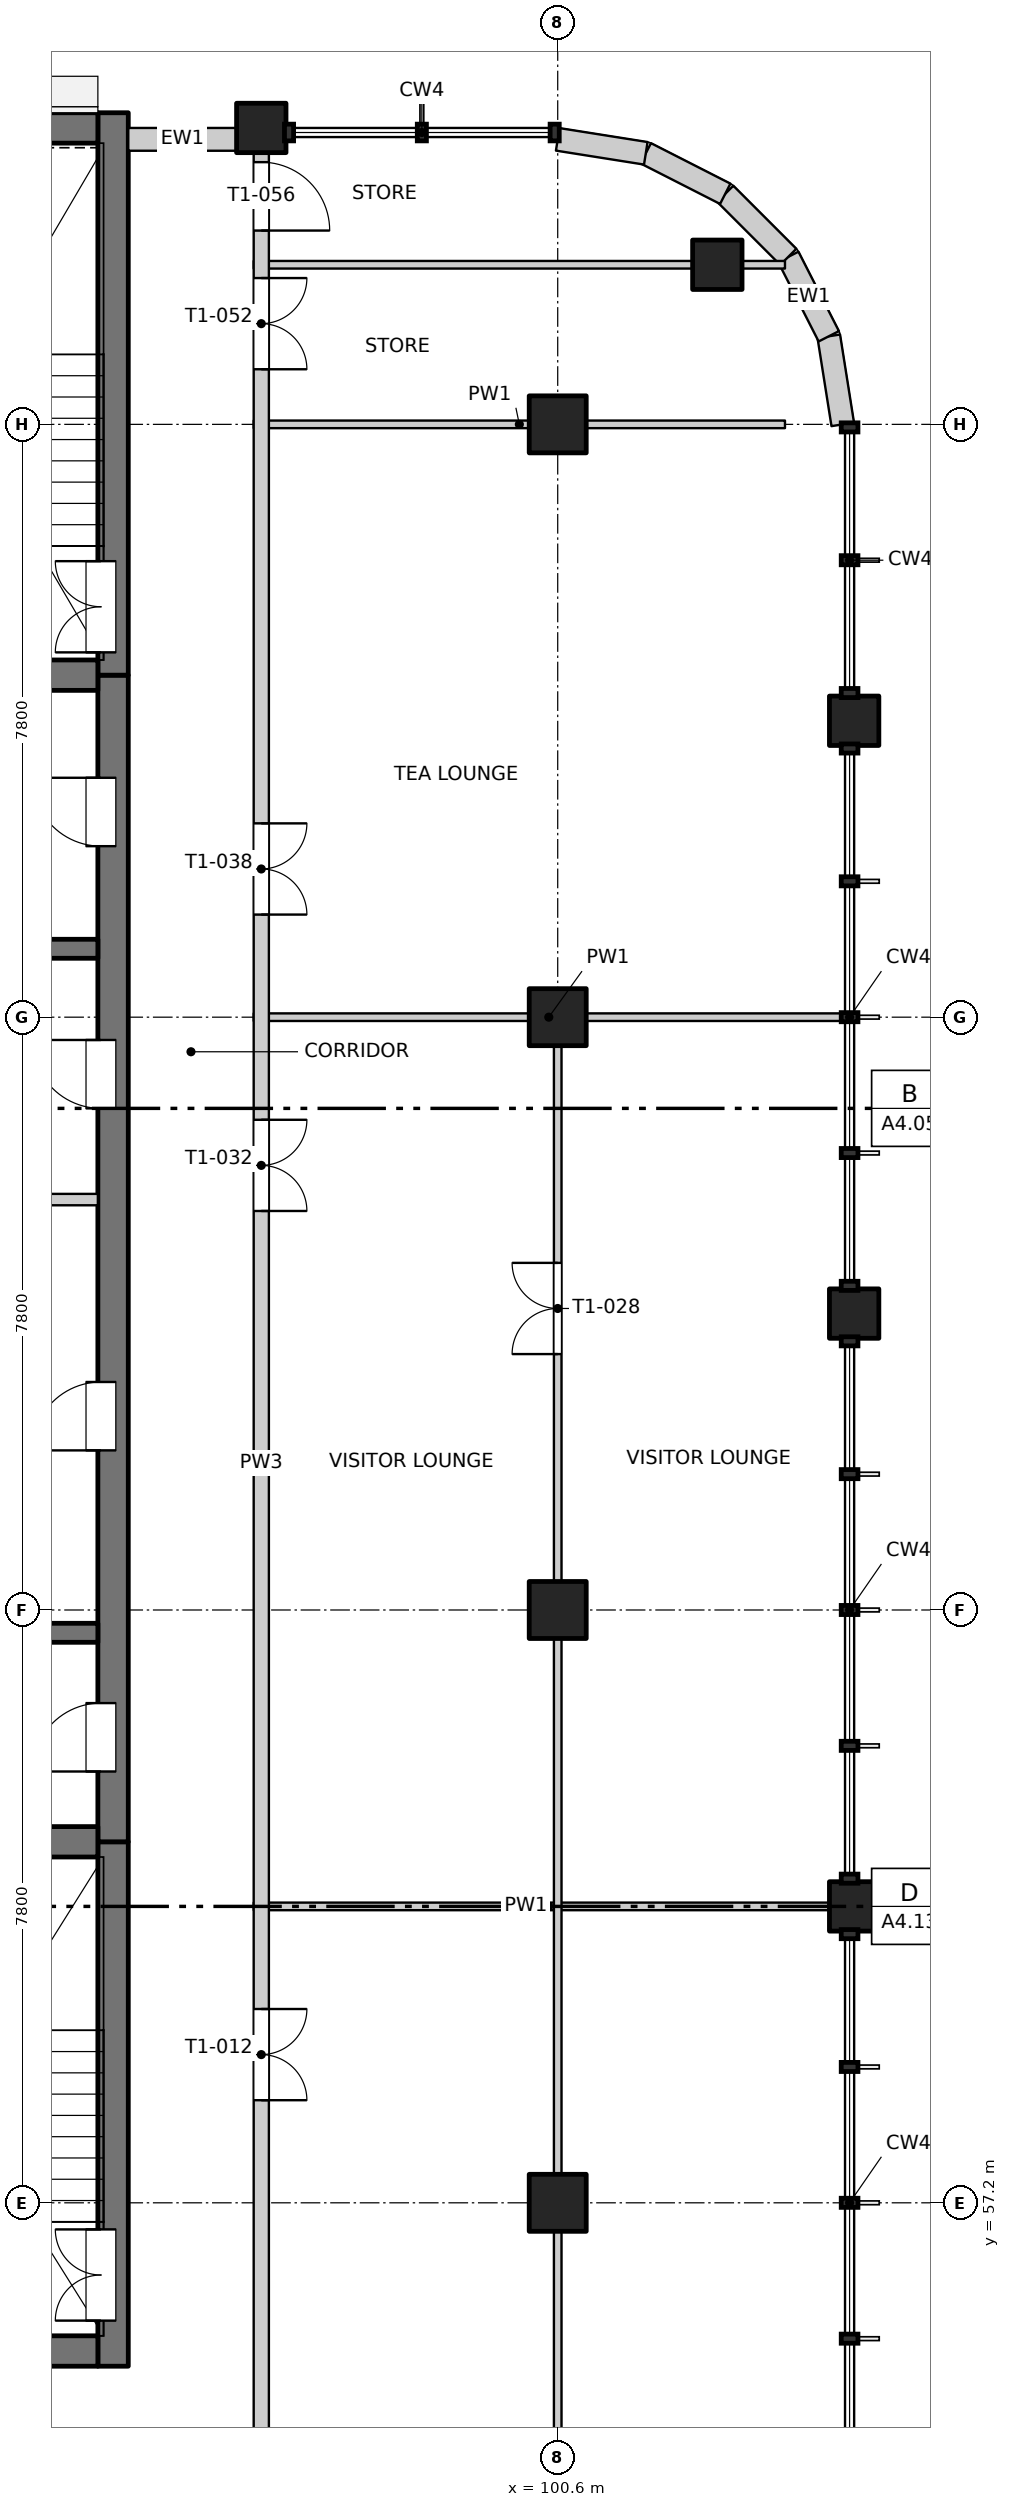
"""IFC4 building model, lengths in metres.
Left out: names, types, materials, properties, quantities, classifications, styles, units other than length and angle.
Written with IfcOpenShell. Run it as: python <this file> out.ifc"""

import sys

from ifc_helpers import new_model, si_unit, direction, frame, frame_2d, origin, origin_2d, place, context, subcontext, project, spatial, rectangle, extrude, element, fill, save


model = new_model("IFC4")
c1 = context("Model", 3, precision=1e-05, world=origin(), true_north=direction((0.0, 1.0)))
c2 = subcontext(c1, "Body", "Model", "MODEL_VIEW")
j1 = project(units=[si_unit("LENGTHUNIT", "METRE"), si_unit("PLANEANGLEUNIT", "RADIAN")], contexts=[c1])
p1 = place(None, origin())
s1 = spatial("IfcSite", under=j1, at=p1, CompositionType="ELEMENT")
p2 = place(p1, origin())
s2 = spatial("IfcBuilding", under=s1, at=p2, CompositionType="ELEMENT")
p3 = place(p2, frame((0.0, 0.0, 263.0)))
s3 = spatial("IfcBuildingStorey", under=s2, at=p3, CompositionType="ELEMENT", Elevation=263.0)
for number, where, z_axis, x_axis in (
    (1, (102.7, 82.7, -0.25), (0.0, 0.0, 1.0), (1.0, 0.0, 0.0)),
    (2, (104.5, 61.1, -0.25), (0.0, 0.0, 1.0), (1.0, 0.0, 0.0)),
    (3, (104.5, 68.9, -0.25), (0.0, 0.0, 1.0), (1.0, 0.0, 0.0)),
    (4, (104.5, 76.7, -0.25), (0.0, 0.0, 1.0), (1.0, 0.0, 0.0)),
    (5, (96.7, 84.5, -0.25), (0.0, 0.0, 1.0), (1.0, 0.0, 0.0)),
):
    element("IfcColumn", number, at=place(p3, frame(where, z_axis=z_axis, x_axis=x_axis)), inside=s3, PredefinedType="COLUMN", context=c2, shape_type="SweptSolid", body=[
        extrude(rectangle(XDim=0.65, YDim=0.65, at=origin_2d()), origin(), (0.0, 0.0, 1.0), 3.35),
    ])
for number, where, z_axis, x_axis in (
    (6, (100.6, 57.2, -0.25), (0.0, 0.0, 1.0), (1.0, 0.0, 0.0)),
    (7, (100.6, 65.0, -0.25), (0.0, 0.0, 1.0), (1.0, 0.0, 0.0)),
    (8, (100.6, 72.8, -0.25), (0.0, 0.0, 1.0), (1.0, 0.0, 0.0)),
    (9, (100.6, 80.6, -0.25), (0.0, 0.0, 1.0), (1.0, 0.0, 0.0)),
):
    element("IfcColumn", number, at=place(p3, frame(where, z_axis=z_axis, x_axis=x_axis)), inside=s3, PredefinedType="COLUMN", context=c2, shape_type="SweptSolid", body=[
        extrude(rectangle(XDim=0.75, YDim=0.75, at=origin_2d()), origin(), (0.0, 0.0, 1.0), 3.35),
    ])
p4 = place(p3, frame((94.75, 55.05, -0.25), z_axis=(0.0, 0.0, 1.0), x_axis=(0.0, 1.0, 0.0)))
e10 = element("IfcWall", 10, at=p4, inside=s3, PredefinedType="SOLIDWALL", context=c2, shape_type="SweptSolid", body=[
    extrude(rectangle(XDim=6.9, YDim=0.4, at=frame_2d((3.45, 0.0))), origin(), (0.0, 0.0, 1.0), 3.35),
])
p5 = place(p4, frame((0.6, 0.0, 0.25)))
e11 = element("IfcOpeningElement", 11, at=p5, cuts=e10, PredefinedType="OPENING", context=c2, shape_type="SweptSolid", body=[
    extrude(rectangle(XDim=1.2, YDim=2.1, at=frame_2d((0.6, 1.05))), frame((0.0, 0.21, 0.0), z_axis=(0.0, -1.0, 0.0), x_axis=(1.0, 0.0, 0.0)), (0.0, 0.0, 1.0), 0.42),
])
p6 = place(p3, frame((94.75, 61.95, -0.25), z_axis=(0.0, 0.0, 1.0), x_axis=(0.0, 1.0, 0.0)))
e12 = element("IfcWall", 12, at=p6, inside=s3, PredefinedType="SOLIDWALL", context=c2, shape_type="SweptSolid", body=[
    extrude(rectangle(XDim=15.35, YDim=0.4, at=frame_2d((7.675, 0.0))), origin(), (0.0, 0.0, 1.0), 3.35),
])
p7 = place(p6, frame((0.925, 0.0, 0.25)))
e13 = element("IfcOpeningElement", 13, at=p7, cuts=e12, PredefinedType="OPENING", context=c2, shape_type="SweptSolid", body=[
    extrude(rectangle(XDim=0.9, YDim=2.1, at=frame_2d((0.45, 1.05))), frame((0.0, 0.21, 0.0), z_axis=(0.0, -1.0, 0.0), x_axis=(1.0, 0.0, 0.0)), (0.0, 0.0, 1.0), 0.42),
])
p8 = place(p6, frame((5.15, 0.0, 0.25)))
e14 = element("IfcOpeningElement", 14, at=p8, cuts=e12, PredefinedType="OPENING", context=c2, shape_type="SweptSolid", body=[
    extrude(rectangle(XDim=0.9, YDim=2.1, at=frame_2d((0.45, 1.05))), frame((0.0, 0.21, 0.0), z_axis=(0.0, -1.0, 0.0), x_axis=(1.0, 0.0, 0.0)), (0.0, 0.0, 1.0), 0.42),
])
p9 = place(p6, frame((9.65, 0.0, 0.25)))
e15 = element("IfcOpeningElement", 15, at=p9, cuts=e12, PredefinedType="OPENING", context=c2, shape_type="SweptSolid", body=[
    extrude(rectangle(XDim=0.9, YDim=2.1, at=frame_2d((0.45, 1.05))), frame((0.0, 0.21, 0.0), z_axis=(0.0, -1.0, 0.0), x_axis=(1.0, 0.0, 0.0)), (0.0, 0.0, 1.0), 0.42),
])
p10 = place(p6, frame((13.1, 0.0, 0.25)))
e16 = element("IfcOpeningElement", 16, at=p10, cuts=e12, PredefinedType="OPENING", context=c2, shape_type="SweptSolid", body=[
    extrude(rectangle(XDim=0.9, YDim=2.1, at=frame_2d((0.45, 1.05))), frame((0.0, 0.21, 0.0), z_axis=(0.0, -1.0, 0.0), x_axis=(1.0, 0.0, 0.0)), (0.0, 0.0, 1.0), 0.42),
])
p11 = place(p3, frame((94.75, 77.3, -0.25), z_axis=(0.0, 0.0, 1.0), x_axis=(0.0, 1.0, 0.0)))
e17 = element("IfcWall", 17, at=p11, inside=s3, PredefinedType="SOLIDWALL", context=c2, shape_type="SweptSolid", body=[
    extrude(rectangle(XDim=7.4, YDim=0.4, at=frame_2d((3.7, 0.0))), origin(), (0.0, 0.0, 1.0), 3.35),
])
p12 = place(p11, frame((0.3, 0.0, 0.25)))
e18 = element("IfcOpeningElement", 18, at=p12, cuts=e17, PredefinedType="OPENING", context=c2, shape_type="SweptSolid", body=[
    extrude(rectangle(XDim=1.2, YDim=2.1, at=frame_2d((0.6, 1.05))), frame((0.0, 0.21, 0.0), z_axis=(0.0, -1.0, 0.0), x_axis=(1.0, 0.0, 0.0)), (0.0, 0.0, 1.0), 0.42),
])
p13 = place(p3, frame((75.45, 55.25, -0.25), z_axis=(0.0, 0.0, 1.0), x_axis=(1.0, 0.0, 0.0)))
e19 = element("IfcWall", 19, at=p13, inside=s3, PredefinedType="SOLIDWALL", context=c2, shape_type="SweptSolid", body=[
    extrude(rectangle(XDim=19.1, YDim=0.4, at=frame_2d((9.55, 0.0))), origin(), (0.0, 0.0, 1.0), 3.35),
])
p14 = place(p13, frame((8.8, 0.0, 0.25)))
e20 = element("IfcOpeningElement", 20, at=p14, cuts=e19, PredefinedType="OPENING", context=c2, shape_type="SweptSolid", body=[
    extrude(rectangle(XDim=1.5, YDim=2.1, at=frame_2d((0.75, 1.05))), frame((0.0, 0.21, 0.0), z_axis=(0.0, -1.0, 0.0), x_axis=(1.0, 0.0, 0.0)), (0.0, 0.0, 1.0), 0.42),
])
p15 = place(p3, frame((75.45, 84.5, -0.25), z_axis=(0.0, 0.0, 1.0), x_axis=(1.0, 0.0, 0.0)))
e21 = element("IfcWall", 21, at=p15, inside=s3, PredefinedType="SOLIDWALL", context=c2, shape_type="SweptSolid", body=[
    extrude(rectangle(XDim=19.1, YDim=0.4, at=frame_2d((9.55, 0.0))), origin(), (0.0, 0.0, 1.0), 3.35),
])
p16 = place(p3, frame((90.675, 61.95, -0.25), z_axis=(0.0, 0.0, 1.0), x_axis=(1.0, 0.0, 0.0)))
e22 = element("IfcWall", 22, at=p16, inside=s3, PredefinedType="SOLIDWALL", context=c2, shape_type="SweptSolid", body=[
    extrude(rectangle(XDim=3.875, YDim=0.4, at=frame_2d((1.938, 0.0))), origin(), (0.0, 0.0, 1.0), 3.35),
])
for number, where, z_axis, x_axis in (
    (23, (90.675, 64.7, -0.25), (0.0, 0.0, 1.0), (1.0, 0.0, 0.0)),
    (24, (90.675, 73.7, -0.25), (0.0, 0.0, 1.0), (1.0, 0.0, 0.0)),
):
    element("IfcWall", number, at=place(p3, frame(where, z_axis=z_axis, x_axis=x_axis)), inside=s3, PredefinedType="SOLIDWALL", context=c2, shape_type="SweptSolid", body=[
        extrude(rectangle(XDim=3.875, YDim=0.25, at=frame_2d((1.938, 0.0))), origin(), (0.0, 0.0, 1.0), 3.35),
    ])
p17 = place(p3, frame((90.675, 77.3, -0.25), z_axis=(0.0, 0.0, 1.0), x_axis=(1.0, 0.0, 0.0)))
e25 = element("IfcWall", 25, at=p17, inside=s3, PredefinedType="SOLIDWALL", context=c2, shape_type="SweptSolid", body=[
    extrude(rectangle(XDim=3.875, YDim=0.4, at=frame_2d((1.938, 0.0))), origin(), (0.0, 0.0, 1.0), 3.35),
])
p18 = place(p3, frame((94.95, 84.35, 0.0), z_axis=(0.0, 0.0, 1.0), x_axis=(1.0, 0.0, 0.0)))
e26 = element("IfcWall", 26, at=p18, inside=s3, PredefinedType="SOLIDWALL", context=c2, shape_type="SweptSolid", body=[
    extrude(rectangle(XDim=1.425, YDim=0.3, at=frame_2d((0.712, 0.0))), origin(), (0.0, 0.0, 1.0), 3.1),
])
p19 = place(p3, frame((104.35, 80.6, 0.0), z_axis=(0.0, 0.0, 1.0), x_axis=(-0.156496880861, 0.987678452879, 0.0)))
e27 = element("IfcWall", 27, at=p19, inside=s3, PredefinedType="SOLIDWALL", context=c2, shape_type="SweptSolid", body=[
    extrude(rectangle(XDim=1.173, YDim=0.3, at=frame_2d((0.586, 0.0))), origin(), (0.0, 0.0, 1.0), 3.1),
])
p20 = place(p3, frame((104.167, 81.759, 0.0), z_axis=(0.0, 0.0, 1.0), x_axis=(-0.454025524128, 0.890988677504, 0.0)))
e28 = element("IfcWall", 28, at=p20, inside=s3, PredefinedType="SOLIDWALL", context=c2, shape_type="SweptSolid", body=[
    extrude(rectangle(XDim=1.173, YDim=0.3, at=frame_2d((0.587, 0.0))), origin(), (0.0, 0.0, 1.0), 3.1),
])
p21 = place(p3, frame((103.634, 82.804, 0.0), z_axis=(0.0, 0.0, 1.0), x_axis=(-0.707106781187, 0.707106781187, 0.0)))
e29 = element("IfcWall", 29, at=p21, inside=s3, PredefinedType="SOLIDWALL", context=c2, shape_type="SweptSolid", body=[
    extrude(rectangle(XDim=1.173, YDim=0.3, at=frame_2d((0.586, 0.0))), origin(), (0.0, 0.0, 1.0), 3.1),
])
p22 = place(p3, frame((102.804, 83.634, 0.0), z_axis=(0.0, 0.0, 1.0), x_axis=(-0.890988677504, 0.454025524128, 0.0)))
e30 = element("IfcWall", 30, at=p22, inside=s3, PredefinedType="SOLIDWALL", context=c2, shape_type="SweptSolid", body=[
    extrude(rectangle(XDim=1.173, YDim=0.3, at=frame_2d((0.587, 0.0))), origin(), (0.0, 0.0, 1.0), 3.1),
])
p23 = place(p3, frame((101.759, 84.167, 0.0), z_axis=(0.0, 0.0, 1.0), x_axis=(-0.987678452879, 0.156496880861, 0.0)))
e31 = element("IfcWall", 31, at=p23, inside=s3, PredefinedType="SOLIDWALL", context=c2, shape_type="SweptSolid", body=[
    extrude(rectangle(XDim=1.173, YDim=0.3, at=frame_2d((0.586, 0.0))), origin(), (0.0, 0.0, 1.0), 3.1),
])
p24 = place(p3, frame((96.6, 61.1, 0.0), z_axis=(0.0, 0.0, 1.0), x_axis=(1.0, 0.0, 0.0)))
e32 = element("IfcWall", 32, at=p24, inside=s3, PredefinedType="PARTITIONING", context=c2, shape_type="SweptSolid", body=[
    extrude(rectangle(XDim=7.765, YDim=0.1, at=frame_2d((3.882, 0.0))), origin(), (0.0, 0.0, 1.0), 3.1),
])
p25 = place(p3, frame((90.675, 70.4, 0.0), z_axis=(0.0, 0.0, 1.0), x_axis=(1.0, 0.0, 0.0)))
e33 = element("IfcWall", 33, at=p25, inside=s3, PredefinedType="PARTITIONING", context=c2, shape_type="SweptSolid", body=[
    extrude(rectangle(XDim=3.875, YDim=0.15, at=frame_2d((1.938, 0.0))), origin(), (0.0, 0.0, 1.0), 3.1),
])
p26 = place(p3, frame((96.6, 72.8, 0.0), z_axis=(0.0, 0.0, 1.0), x_axis=(1.0, 0.0, 0.0)))
e34 = element("IfcWall", 34, at=p26, inside=s3, PredefinedType="PARTITIONING", context=c2, shape_type="SweptSolid", body=[
    extrude(rectangle(XDim=7.765, YDim=0.1, at=frame_2d((3.882, 0.0))), origin(), (0.0, 0.0, 1.0), 3.1),
])
for number, where, z_axis, x_axis in (
    (35, (96.6, 80.6, 0.0), (0.0, 0.0, 1.0), (1.0, 0.0, 0.0)),
    (36, (96.6, 82.7, 0.0), (0.0, 0.0, 1.0), (1.0, 0.0, 0.0)),
):
    element("IfcWall", number, at=place(p3, frame(where, z_axis=z_axis, x_axis=x_axis)), inside=s3, PredefinedType="PARTITIONING", context=c2, shape_type="SweptSolid", body=[
        extrude(rectangle(XDim=6.99, YDim=0.1, at=frame_2d((3.495, 0.0))), origin(), (0.0, 0.0, 1.0), 3.1),
    ])
p27 = place(p3, frame((96.7, 49.5, 0.0), z_axis=(0.0, 0.0, 1.0), x_axis=(0.0, 1.0, 0.0)))
e37 = element("IfcWall", 37, at=p27, inside=s3, PredefinedType="PARTITIONING", context=c2, shape_type="SweptSolid", body=[
    extrude(rectangle(XDim=34.865, YDim=0.2, at=frame_2d((17.433, 0.0))), origin(), (0.0, 0.0, 1.0), 3.1),
])
p28 = place(p27, frame((9.05, 0.0, 0.0)))
e38 = element("IfcOpeningElement", 38, at=p28, cuts=e37, PredefinedType="OPENING", context=c2, shape_type="SweptSolid", body=[
    extrude(rectangle(XDim=1.2, YDim=2.1, at=frame_2d((0.6, 1.05))), frame((0.0, 0.11, 0.0), z_axis=(0.0, -1.0, 0.0), x_axis=(1.0, 0.0, 0.0)), (0.0, 0.0, 1.0), 0.22),
])
p29 = place(p27, frame((20.75, 0.0, 0.0)))
e39 = element("IfcOpeningElement", 39, at=p29, cuts=e37, PredefinedType="OPENING", context=c2, shape_type="SweptSolid", body=[
    extrude(rectangle(XDim=1.2, YDim=2.1, at=frame_2d((0.6, 1.05))), frame((0.0, 0.11, 0.0), z_axis=(0.0, -1.0, 0.0), x_axis=(1.0, 0.0, 0.0)), (0.0, 0.0, 1.0), 0.22),
])
p30 = place(p27, frame((24.65, 0.0, 0.0)))
e40 = element("IfcOpeningElement", 40, at=p30, cuts=e37, PredefinedType="OPENING", context=c2, shape_type="SweptSolid", body=[
    extrude(rectangle(XDim=1.2, YDim=2.1, at=frame_2d((0.6, 1.05))), frame((0.0, 0.11, 0.0), z_axis=(0.0, -1.0, 0.0), x_axis=(1.0, 0.0, 0.0)), (0.0, 0.0, 1.0), 0.22),
])
p31 = place(p27, frame((31.825, 0.0, 0.0)))
e41 = element("IfcOpeningElement", 41, at=p31, cuts=e37, PredefinedType="OPENING", context=c2, shape_type="SweptSolid", body=[
    extrude(rectangle(XDim=1.2, YDim=2.1, at=frame_2d((0.6, 1.05))), frame((0.0, 0.11, 0.0), z_axis=(0.0, -1.0, 0.0), x_axis=(1.0, 0.0, 0.0)), (0.0, 0.0, 1.0), 0.22),
])
p32 = place(p27, frame((33.65, 0.0, 0.0)))
e42 = element("IfcOpeningElement", 42, at=p32, cuts=e37, PredefinedType="OPENING", context=c2, shape_type="SweptSolid", body=[
    extrude(rectangle(XDim=0.9, YDim=2.1, at=frame_2d((0.45, 1.05))), frame((0.0, 0.11, 0.0), z_axis=(0.0, -1.0, 0.0), x_axis=(1.0, 0.0, 0.0)), (0.0, 0.0, 1.0), 0.22),
])
p33 = place(p3, frame((100.6, 47.35, 0.0), z_axis=(0.0, 0.0, 1.0), x_axis=(0.0, 1.0, 0.0)))
e43 = element("IfcWall", 43, at=p33, inside=s3, PredefinedType="PARTITIONING", context=c2, shape_type="SweptSolid", body=[
    extrude(rectangle(XDim=25.4, YDim=0.1, at=frame_2d((12.7, 0.0))), origin(), (0.0, 0.0, 1.0), 3.1),
])
p34 = place(p33, frame((5.35, 0.0, 0.0)))
e44 = element("IfcOpeningElement", 44, at=p34, cuts=e43, PredefinedType="OPENING", context=c2, shape_type="SweptSolid", body=[
    extrude(rectangle(XDim=1.2, YDim=2.1, at=frame_2d((0.6, 1.05))), frame((0.0, 0.06, 0.0), z_axis=(0.0, -1.0, 0.0), x_axis=(1.0, 0.0, 0.0)), (0.0, 0.0, 1.0), 0.12),
])
p35 = place(p33, frame((21.017, 0.0, 0.0)))
e45 = element("IfcOpeningElement", 45, at=p35, cuts=e43, PredefinedType="OPENING", context=c2, shape_type="SweptSolid", body=[
    extrude(rectangle(XDim=1.2, YDim=2.1, at=frame_2d((0.6, 1.05))), frame((0.0, 0.06, 0.0), z_axis=(0.0, -1.0, 0.0), x_axis=(1.0, 0.0, 0.0)), (0.0, 0.0, 1.0), 0.12),
])
p36 = place(p5, origin())
e46 = element("IfcDoor", 46, at=p36, inside=s3, OperationType="DOUBLE_DOOR_SINGLE_SWING", PredefinedType="DOOR", context=c2, shape_type="SweptSolid", body=[
    extrude(rectangle(XDim=1.2, YDim=2.1, at=frame_2d((0.6, 1.05))), frame((0.0, 0.185, 0.0), z_axis=(0.0, -1.0, 0.0), x_axis=(1.0, 0.0, 0.0)), (0.0, 0.0, 1.0), 0.05),
])
fill(e11, e46)
p37 = place(p28, origin())
e47 = element("IfcDoor", 47, at=p37, inside=s3, OperationType="DOUBLE_DOOR_SINGLE_SWING", PredefinedType="DOOR", context=c2, shape_type="SweptSolid", body=[
    extrude(rectangle(XDim=1.2, YDim=2.1, at=frame_2d((0.6, 1.05))), frame((0.0, 0.025, 0.0), z_axis=(0.0, -1.0, 0.0), x_axis=(1.0, 0.0, 0.0)), (0.0, 0.0, 1.0), 0.05),
])
fill(e38, e47)
p38 = place(p7, origin())
e48 = element("IfcDoor", 48, at=p38, inside=s3, OperationType="SINGLE_SWING_LEFT", PredefinedType="DOOR", context=c2, shape_type="SweptSolid", body=[
    extrude(rectangle(XDim=0.9, YDim=2.1, at=frame_2d((0.45, 1.05))), frame((0.0, 0.185, 0.0), z_axis=(0.0, -1.0, 0.0), x_axis=(1.0, 0.0, 0.0)), (0.0, 0.0, 1.0), 0.05),
])
fill(e13, e48)
p39 = place(p8, origin())
e49 = element("IfcDoor", 49, at=p39, inside=s3, OperationType="SINGLE_SWING_LEFT", PredefinedType="DOOR", context=c2, shape_type="SweptSolid", body=[
    extrude(rectangle(XDim=0.9, YDim=2.1, at=frame_2d((0.45, 1.05))), frame((0.0, 0.185, 0.0), z_axis=(0.0, -1.0, 0.0), x_axis=(1.0, 0.0, 0.0)), (0.0, 0.0, 1.0), 0.05),
])
fill(e14, e49)
p40 = place(p35, origin())
e50 = element("IfcDoor", 50, at=p40, inside=s3, OperationType="DOUBLE_DOOR_SINGLE_SWING", PredefinedType="DOOR", context=c2, shape_type="SweptSolid", body=[
    extrude(rectangle(XDim=1.2, YDim=2.1, at=frame_2d((0.6, 1.05))), frame((0.0, 0.025, 0.0), z_axis=(0.0, -1.0, 0.0), x_axis=(1.0, 0.0, 0.0)), (0.0, 0.0, 1.0), 0.05),
])
fill(e45, e50)
p41 = place(p29, origin())
e51 = element("IfcDoor", 51, at=p41, inside=s3, OperationType="DOUBLE_DOOR_SINGLE_SWING", PredefinedType="DOOR", context=c2, shape_type="SweptSolid", body=[
    extrude(rectangle(XDim=1.2, YDim=2.1, at=frame_2d((0.6, 1.05))), frame((0.0, 0.025, 0.0), z_axis=(0.0, -1.0, 0.0), x_axis=(1.0, 0.0, 0.0)), (0.0, 0.0, 1.0), 0.05),
])
fill(e39, e51)
p42 = place(p9, origin())
e52 = element("IfcDoor", 52, at=p42, inside=s3, OperationType="SINGLE_SWING_RIGHT", PredefinedType="DOOR", context=c2, shape_type="SweptSolid", body=[
    extrude(rectangle(XDim=0.9, YDim=2.1, at=frame_2d((0.45, 1.05))), frame((0.0, 0.185, 0.0), z_axis=(0.0, -1.0, 0.0), x_axis=(1.0, 0.0, 0.0)), (0.0, 0.0, 1.0), 0.05),
])
fill(e15, e52)
p43 = place(p30, origin())
e53 = element("IfcDoor", 53, at=p43, inside=s3, OperationType="DOUBLE_DOOR_SINGLE_SWING", PredefinedType="DOOR", context=c2, shape_type="SweptSolid", body=[
    extrude(rectangle(XDim=1.2, YDim=2.1, at=frame_2d((0.6, 1.05))), frame((0.0, 0.025, 0.0), z_axis=(0.0, -1.0, 0.0), x_axis=(1.0, 0.0, 0.0)), (0.0, 0.0, 1.0), 0.05),
])
fill(e40, e53)
p44 = place(p10, origin())
e54 = element("IfcDoor", 54, at=p44, inside=s3, OperationType="SINGLE_SWING_RIGHT", PredefinedType="DOOR", context=c2, shape_type="SweptSolid", body=[
    extrude(rectangle(XDim=0.9, YDim=2.1, at=frame_2d((0.45, 1.05))), frame((0.0, 0.185, 0.0), z_axis=(0.0, -1.0, 0.0), x_axis=(1.0, 0.0, 0.0)), (0.0, 0.0, 1.0), 0.05),
])
fill(e16, e54)
p45 = place(p12, origin())
e55 = element("IfcDoor", 55, at=p45, inside=s3, OperationType="DOUBLE_DOOR_SINGLE_SWING", PredefinedType="DOOR", context=c2, shape_type="SweptSolid", body=[
    extrude(rectangle(XDim=1.2, YDim=2.1, at=frame_2d((0.6, 1.05))), frame((0.0, 0.185, 0.0), z_axis=(0.0, -1.0, 0.0), x_axis=(1.0, 0.0, 0.0)), (0.0, 0.0, 1.0), 0.05),
])
fill(e18, e55)
p46 = place(p31, origin())
e56 = element("IfcDoor", 56, at=p46, inside=s3, OperationType="DOUBLE_DOOR_SINGLE_SWING", PredefinedType="DOOR", context=c2, shape_type="SweptSolid", body=[
    extrude(rectangle(XDim=1.2, YDim=2.1, at=frame_2d((0.6, 1.05))), frame((0.0, 0.025, 0.0), z_axis=(0.0, -1.0, 0.0), x_axis=(1.0, 0.0, 0.0)), (0.0, 0.0, 1.0), 0.05),
])
fill(e41, e56)
p47 = place(p32, origin())
e57 = element("IfcDoor", 57, at=p47, inside=s3, OperationType="SINGLE_SWING_RIGHT", PredefinedType="DOOR", context=c2, shape_type="SweptSolid", body=[
    extrude(rectangle(XDim=0.9, YDim=2.1, at=frame_2d((0.45, 1.05))), frame((0.0, 0.025, 0.0), z_axis=(0.0, -1.0, 0.0), x_axis=(1.0, 0.0, 0.0)), (0.0, 0.0, 1.0), 0.05),
])
fill(e42, e57)
save(model, sys.argv[1])
